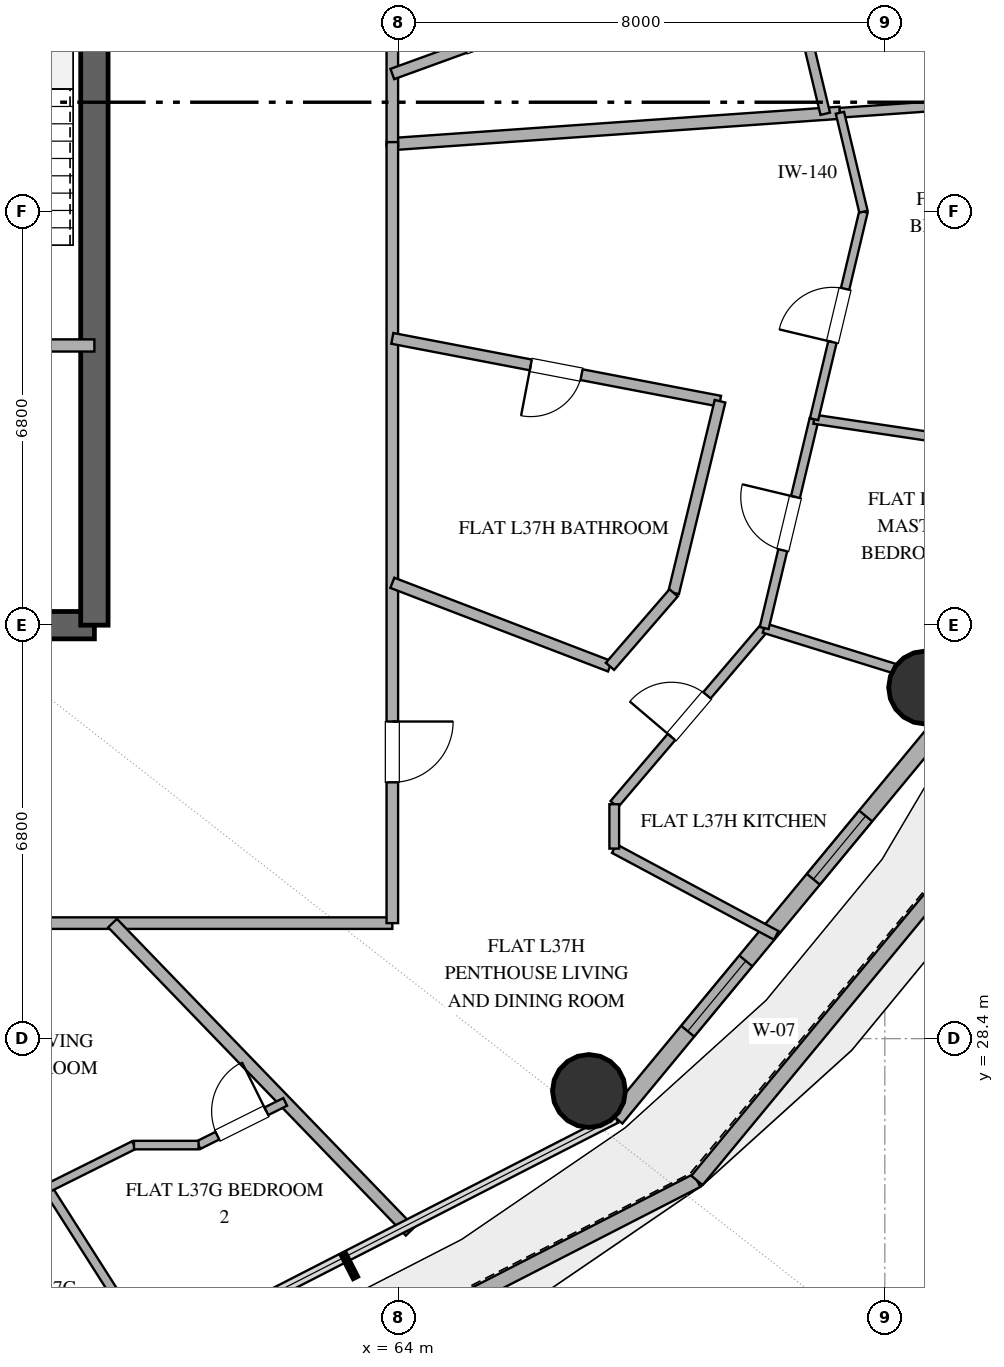
"""IFC4 building model, lengths in metres.
Left out: names, types, materials, properties, quantities, classifications, styles, units other than length and angle.
Written with IfcOpenShell. Run it as: python <this file> out.ifc"""

import sys

from ifc_helpers import new_model, si_unit, direction, frame, frame_2d, origin, origin_2d, place, context, subcontext, project, spatial, rectangle, hollow_circle, extrude, element, fill, save


model = new_model("IFC4")
c1 = context("Model", 3, precision=1e-05, world=origin(), true_north=direction((0.0, 1.0)))
c2 = subcontext(c1, "Body", "Model", "MODEL_VIEW")
j1 = project(units=[si_unit("LENGTHUNIT", "METRE"), si_unit("PLANEANGLEUNIT", "RADIAN")], contexts=[c1])
p1 = place(None, origin())
s1 = spatial("IfcSite", under=j1, at=p1, CompositionType="ELEMENT")
p2 = place(p1, origin())
s2 = spatial("IfcBuilding", under=s1, at=p2, CompositionType="ELEMENT")
p3 = place(p2, frame((0.0, 0.0, 150.6)))
s3 = spatial("IfcBuildingStorey", under=s2, at=p3, CompositionType="ELEMENT", Elevation=150.6)
p4 = place(p3, frame((55.0, 35.2, 0.0), z_axis=(0.0, 0.0, 1.0), x_axis=(1.0, 0.0, 0.0)))
e1 = element("IfcWall", 1, at=p4, inside=s3, PredefinedType="SHEAR", context=c2, shape_type="SweptSolid", body=[
    extrude(rectangle(XDim=4.0, YDim=0.45, at=frame_2d((2.0, 0.0))), origin(), (0.0, 0.0, 1.0), 3.38),
])
p5 = place(p4, frame((1.4, 0.0, 0.0)))
e2 = element("IfcOpeningElement", 2, at=p5, cuts=e1, PredefinedType="OPENING", context=c2, shape_type="SweptSolid", body=[
    extrude(rectangle(XDim=1.2, YDim=2.15, at=frame_2d((0.6, 1.075))), frame((0.0, 0.235, 0.0), z_axis=(0.0, -1.0, 0.0), x_axis=(1.0, 0.0, 0.0)), (0.0, 0.0, 1.0), 0.47),
])
p6 = place(p3, frame((59.0, 35.2, 0.0), z_axis=(0.0, 0.0, 1.0), x_axis=(0.0, 1.0, 0.0)))
e3 = element("IfcWall", 3, at=p6, inside=s3, PredefinedType="SHEAR", context=c2, shape_type="SweptSolid", body=[
    extrude(rectangle(XDim=13.6, YDim=0.45, at=frame_2d((6.8, 0.0))), origin(), (0.0, 0.0, 1.0), 3.38),
])
for number, where, z_axis, x_axis in (
    (4, (67.134, 27.54, 0.0), (0.0, 0.0, 1.0), (1.0, 0.0, 0.0)),
    (5, (72.662, 34.174, 0.0), (0.0, 0.0, 1.0), (1.0, 0.0, 0.0)),
):
    element("IfcColumn", number, at=place(p3, frame(where, z_axis=z_axis, x_axis=x_axis)), inside=s3, PredefinedType="COLUMN", context=c2, shape_type="SweptSolid", body=[
        extrude(hollow_circle(Radius=0.6, WallThickness=0.032, at=origin_2d()), origin(), (0.0, 0.0, 1.0), 3.38),
    ])
p7 = place(p3, frame((59.389, 21.185, 0.0), z_axis=(0.0, 0.0, 1.0), x_axis=(0.8897661473, 0.456416698992, 0.0)))
e6 = element("IfcWall", 6, at=p7, inside=s3, PredefinedType="PARAPET", context=c2, shape_type="SweptSolid", body=[
    extrude(rectangle(XDim=10.7, YDim=0.24, at=frame_2d((5.35, 0.0))), origin(), (0.0, 0.0, 1.0), 1.25),
])
p8 = place(p3, frame((68.91, 26.069, 0.0), z_axis=(0.0, 0.0, 1.0), x_axis=(0.637107627078, 0.770774851379, 0.0)))
e7 = element("IfcWall", 7, at=p8, inside=s3, PredefinedType="PARAPET", context=c2, shape_type="SweptSolid", body=[
    extrude(rectangle(XDim=9.483, YDim=0.24, at=frame_2d((4.742, 0.0))), origin(), (0.0, 0.0, 1.0), 1.25),
])
p9 = place(p3, frame((67.576, 27.094, 0.0), z_axis=(0.0, 0.0, 1.0), x_axis=(0.637333477683, 0.770588111915, 0.0)))
e8 = element("IfcWall", 8, at=p9, inside=s3, PredefinedType="SOLIDWALL", context=c2, shape_type="SweptSolid", body=[
    extrude(rectangle(XDim=8.875, YDim=0.28, at=frame_2d((4.438, 0.0))), origin(), (0.0, 0.0, 1.0), 3.38),
])
p10 = place(p9, frame((1.854, 0.0, 0.85)))
e9 = element("IfcOpeningElement", 9, at=p10, cuts=e8, PredefinedType="OPENING", context=c2, shape_type="SweptSolid", body=[
    extrude(rectangle(XDim=1.5, YDim=1.8, at=frame_2d((0.75, 0.9))), frame((0.0, 0.15, 0.0), z_axis=(0.0, -1.0, 0.0), x_axis=(1.0, 0.0, 0.0)), (0.0, 0.0, 1.0), 0.3),
])
p11 = place(p9, frame((5.097, 0.0, 0.85)))
e10 = element("IfcOpeningElement", 10, at=p11, cuts=e8, PredefinedType="OPENING", context=c2, shape_type="SweptSolid", body=[
    extrude(rectangle(XDim=1.35, YDim=1.8, at=frame_2d((0.675, 0.9))), frame((0.0, 0.15, 0.0), z_axis=(0.0, -1.0, 0.0), x_axis=(1.0, 0.0, 0.0)), (0.0, 0.0, 1.0), 0.3),
])
p12 = place(p3, frame((55.0, 39.8, 0.0), z_axis=(0.0, 0.0, 1.0), x_axis=(1.0, 0.0, 0.0)))
e11 = element("IfcWall", 11, at=p12, inside=s3, PredefinedType="SOLIDWALL", context=c2, shape_type="SweptSolid", body=[
    extrude(rectangle(XDim=4.0, YDim=0.2, at=frame_2d((2.0, 0.0))), origin(), (0.0, 0.0, 1.0), 2.74),
])
p13 = place(p12, frame((1.45, 0.0, 0.0)))
e12 = element("IfcOpeningElement", 12, at=p13, cuts=e11, PredefinedType="OPENING", context=c2, shape_type="SweptSolid", body=[
    extrude(rectangle(XDim=1.1, YDim=2.15, at=frame_2d((0.55, 1.075))), frame((0.0, 0.11, 0.0), z_axis=(0.0, -1.0, 0.0), x_axis=(1.0, 0.0, 0.0)), (0.0, 0.0, 1.0), 0.22),
])
p14 = place(p3, frame((48.891, 30.3, 0.0), z_axis=(0.0, 0.0, 1.0), x_axis=(1.0, 0.0, 0.0)))
e13 = element("IfcWall", 13, at=p14, inside=s3, PredefinedType="PARTITIONING", context=c2, shape_type="SweptSolid", body=[
    extrude(rectangle(XDim=15.009, YDim=0.19, at=frame_2d((7.504, 0.0))), origin(), (0.0, 0.0, 1.0), 2.74),
])
p15 = place(p14, frame((4.704, 0.0, 0.0)))
e14 = element("IfcOpeningElement", 14, at=p15, cuts=e13, PredefinedType="OPENING", context=c2, shape_type="SweptSolid", body=[
    extrude(rectangle(XDim=1.0, YDim=2.2, at=frame_2d((0.5, 1.1))), frame((0.0, 0.105, 0.0), z_axis=(0.0, -1.0, 0.0), x_axis=(1.0, 0.0, 0.0)), (0.0, 0.0, 1.0), 0.21),
])
p16 = place(p3, frame((71.261, 43.627, 0.0), z_axis=(0.0, 0.0, 1.0), x_axis=(-0.997562906323, -0.069772830877, 0.0)))
e15 = element("IfcWall", 15, at=p16, inside=s3, PredefinedType="PARTITIONING", context=c2, shape_type="SweptSolid", body=[
    extrude(rectangle(XDim=7.38, YDim=0.2, at=frame_2d((3.69, 0.0))), origin(), (0.0, 0.0, 1.0), 2.74),
])
p17 = place(p3, frame((63.9, 53.7, 0.0), z_axis=(0.0, 0.0, 1.0), x_axis=(0.0, -1.0, 0.0)))
e16 = element("IfcWall", 16, at=p17, inside=s3, PredefinedType="PARTITIONING", context=c2, shape_type="SweptSolid", body=[
    extrude(rectangle(XDim=10.62, YDim=0.19, at=frame_2d((5.31, 0.0))), origin(), (0.0, 0.0, 1.0), 2.74),
])
p18 = place(p17, frame((2.48, 0.0, 0.0)))
e17 = element("IfcOpeningElement", 17, at=p18, cuts=e16, PredefinedType="OPENING", context=c2, shape_type="SweptSolid", body=[
    extrude(rectangle(XDim=1.0, YDim=2.2, at=frame_2d((0.5, 1.1))), frame((0.0, 0.105, 0.0), z_axis=(0.0, -1.0, 0.0), x_axis=(1.0, 0.0, 0.0)), (0.0, 0.0, 1.0), 0.21),
])
p19 = place(p3, frame((63.9, 43.144, 0.0), z_axis=(0.0, 0.0, 1.0), x_axis=(0.0, -1.0, 0.0)))
e18 = element("IfcWall", 18, at=p19, inside=s3, PredefinedType="PARTITIONING", context=c2, shape_type="SweptSolid", body=[
    extrude(rectangle(XDim=12.844, YDim=0.19, at=frame_2d((6.422, 0.0))), origin(), (0.0, 0.0, 1.0), 2.74),
])
p20 = place(p19, frame((9.529, 0.0, 0.0)))
e19 = element("IfcOpeningElement", 19, at=p20, cuts=e18, PredefinedType="OPENING", context=c2, shape_type="SweptSolid", body=[
    extrude(rectangle(XDim=1.0, YDim=2.2, at=frame_2d((0.5, 1.1))), frame((0.0, 0.105, 0.0), z_axis=(0.0, -1.0, 0.0), x_axis=(1.0, 0.0, 0.0)), (0.0, 0.0, 1.0), 0.21),
])
p21 = place(p3, frame((69.29, 38.883, 0.0), z_axis=(0.0, 0.0, 1.0), x_axis=(-0.98210182834, 0.188350733396, 0.0)))
e20 = element("IfcWall", 20, at=p21, inside=s3, PredefinedType="PLUMBINGWALL", context=c2, shape_type="SweptSolid", body=[
    extrude(rectangle(XDim=5.488, YDim=0.18, at=frame_2d((2.744, 0.0))), origin(), (0.0, 0.0, 1.0), 2.74),
])
p22 = place(p21, frame((2.319, 0.0, 0.0)))
e21 = element("IfcOpeningElement", 21, at=p22, cuts=e20, PredefinedType="OPENING", context=c2, shape_type="SweptSolid", body=[
    extrude(rectangle(XDim=0.85, YDim=2.1, at=frame_2d((0.425, 1.05))), frame((0.0, 0.1, 0.0), z_axis=(0.0, -1.0, 0.0), x_axis=(1.0, 0.0, 0.0)), (0.0, 0.0, 1.0), 0.2),
])
p23 = place(p3, frame((69.793, 48.728, 0.0), z_axis=(0.0, 0.0, 1.0), x_axis=(0.23310450522, -0.972451690135, 0.0)))
e22 = element("IfcWall", 22, at=p23, inside=s3, PredefinedType="PLUMBINGWALL", context=c2, shape_type="SweptSolid", body=[
    extrude(rectangle(XDim=5.263, YDim=0.16, at=frame_2d((2.631, 0.0))), origin(), (0.0, 0.0, 1.0), 2.74),
])
p24 = place(p23, frame((2.181, 0.0, 0.0)))
e23 = element("IfcOpeningElement", 23, at=p24, cuts=e22, PredefinedType="OPENING", context=c2, shape_type="SweptSolid", body=[
    extrude(rectangle(XDim=0.9, YDim=2.1, at=frame_2d((0.45, 1.05))), frame((0.0, 0.09, 0.0), z_axis=(0.0, -1.0, 0.0), x_axis=(1.0, 0.0, 0.0)), (0.0, 0.0, 1.0), 0.18),
])
p25 = place(p3, frame((59.299, 30.3, 0.0), z_axis=(0.0, 0.0, 1.0), x_axis=(0.694647685064, -0.719350118952, 0.0)))
e24 = element("IfcWall", 24, at=p25, inside=s3, PredefinedType="PARTITIONING", context=c2, shape_type="SweptSolid", body=[
    extrude(rectangle(XDim=7.047, YDim=0.2, at=frame_2d((3.523, 0.0))), origin(), (0.0, 0.0, 1.0), 2.74),
])
p26 = place(p3, frame((63.9, 35.896, 0.0), z_axis=(0.0, 0.0, 1.0), x_axis=(0.933598121494, -0.3583218491, 0.0)))
e25 = element("IfcWall", 25, at=p26, inside=s3, PredefinedType="PLUMBINGWALL", context=c2, shape_type="SweptSolid", body=[
    extrude(rectangle(XDim=3.834, YDim=0.18, at=frame_2d((1.917, 0.0))), origin(), (0.0, 0.0, 1.0), 2.74),
])
p27 = place(p3, frame((67.55, 32.256, 0.0), z_axis=(0.0, 0.0, 1.0), x_axis=(0.648060027494, 0.76158925988, 0.0)))
e26 = element("IfcWall", 26, at=p27, inside=s3, PredefinedType="PLUMBINGWALL", context=c2, shape_type="SweptSolid", body=[
    extrude(rectangle(XDim=3.804, YDim=0.16, at=frame_2d((1.902, 0.0))), origin(), (0.0, 0.0, 1.0), 2.74),
])
p28 = place(p27, frame((1.452, 0.0, 0.0)))
e27 = element("IfcOpeningElement", 27, at=p28, cuts=e26, PredefinedType="OPENING", context=c2, shape_type="SweptSolid", body=[
    extrude(rectangle(XDim=0.9, YDim=2.1, at=frame_2d((0.45, 1.05))), frame((0.0, 0.09, 0.0), z_axis=(0.0, -1.0, 0.0), x_axis=(1.0, 0.0, 0.0)), (0.0, 0.0, 1.0), 0.18),
])
p29 = place(p3, frame((70.015, 35.153, 0.0), z_axis=(0.0, 0.0, 1.0), x_axis=(0.954891562425, -0.296954717101, 0.0)))
e28 = element("IfcWall", 28, at=p29, inside=s3, PredefinedType="PLUMBINGWALL", context=c2, shape_type="SweptSolid", body=[
    extrude(rectangle(XDim=3.539, YDim=0.16, at=frame_2d((1.769, 0.0))), origin(), (0.0, 0.0, 1.0), 2.74),
])
p30 = place(p3, frame((71.261, 43.627, 0.0), z_axis=(0.0, 0.0, 1.0), x_axis=(0.997563824095, 0.069759707979, 0.0)))
e29 = element("IfcWall", 29, at=p30, inside=s3, PredefinedType="PLUMBINGWALL", context=c2, shape_type="SweptSolid", body=[
    extrude(rectangle(XDim=3.535, YDim=0.16, at=frame_2d((1.767, 0.0))), origin(), (0.0, 0.0, 1.0), 2.74),
])
p31 = place(p3, frame((70.015, 35.153, 0.0), z_axis=(0.0, 0.0, 1.0), x_axis=(0.232452361323, 0.972607783084, 0.0)))
e30 = element("IfcWall", 30, at=p31, inside=s3, PredefinedType="PARTITIONING", context=c2, shape_type="SweptSolid", body=[
    extrude(rectangle(XDim=3.531, YDim=0.15, at=frame_2d((1.766, 0.0))), origin(), (0.0, 0.0, 1.0), 2.74),
])
p32 = place(p31, frame((1.315, 0.0, 0.0)))
e31 = element("IfcOpeningElement", 31, at=p32, cuts=e30, PredefinedType="OPENING", context=c2, shape_type="SweptSolid", body=[
    extrude(rectangle(XDim=0.9, YDim=2.1, at=frame_2d((0.45, 1.05))), frame((0.0, 0.085, 0.0), z_axis=(0.0, -1.0, 0.0), x_axis=(1.0, 0.0, 0.0)), (0.0, 0.0, 1.0), 0.17),
])
p33 = place(p3, frame((74.312, 38.068, 0.0), z_axis=(0.0, 0.0, 1.0), x_axis=(-0.989013160958, 0.147827492205, 0.0)))
e32 = element("IfcWall", 32, at=p33, inside=s3, PredefinedType="PARTITIONING", context=c2, shape_type="SweptSolid", body=[
    extrude(rectangle(XDim=3.514, YDim=0.15, at=frame_2d((1.757, 0.0))), origin(), (0.0, 0.0, 1.0), 2.74),
])
p34 = place(p3, frame((70.836, 38.587, 0.0), z_axis=(0.0, 0.0, 1.0), x_axis=(0.231598574747, 0.972811441223, 0.0)))
e33 = element("IfcWall", 33, at=p34, inside=s3, PredefinedType="PARTITIONING", context=c2, shape_type="SweptSolid", body=[
    extrude(rectangle(XDim=3.508, YDim=0.14, at=frame_2d((1.754, 0.0))), origin(), (0.0, 0.0, 1.0), 2.74),
])
p35 = place(p34, frame((1.304, 0.0, 0.0)))
e34 = element("IfcOpeningElement", 34, at=p35, cuts=e33, PredefinedType="OPENING", context=c2, shape_type="SweptSolid", body=[
    extrude(rectangle(XDim=0.9, YDim=2.1, at=frame_2d((0.45, 1.05))), frame((0.0, 0.08, 0.0), z_axis=(0.0, -1.0, 0.0), x_axis=(1.0, 0.0, 0.0)), (0.0, 0.0, 1.0), 0.16),
])
p36 = place(p3, frame((63.9, 44.264, 0.0), z_axis=(0.0, 0.0, 1.0), x_axis=(0.939936319397, 0.341349843238, 0.0)))
e35 = element("IfcWall", 35, at=p36, inside=s3, PredefinedType="PLUMBINGWALL", context=c2, shape_type="SweptSolid", body=[
    extrude(rectangle(XDim=3.39, YDim=0.18, at=frame_2d((1.695, 0.0))), origin(), (0.0, 0.0, 1.0), 2.74),
])
p37 = place(p36, frame((1.27, 0.0, 0.0)))
e36 = element("IfcOpeningElement", 36, at=p37, cuts=e35, PredefinedType="OPENING", context=c2, shape_type="SweptSolid", body=[
    extrude(rectangle(XDim=0.85, YDim=2.1, at=frame_2d((0.425, 1.05))), frame((0.0, 0.1, 0.0), z_axis=(0.0, -1.0, 0.0), x_axis=(1.0, 0.0, 0.0)), (0.0, 0.0, 1.0), 0.2),
])
p38 = place(p3, frame((60.042, 23.097, 0.0), z_axis=(0.0, 0.0, 1.0), x_axis=(-0.537325063909, 0.843375228291, 0.0)))
e37 = element("IfcWall", 37, at=p38, inside=s3, PredefinedType="PARTITIONING", context=c2, shape_type="SweptSolid", body=[
    extrude(rectangle(XDim=3.373, YDim=0.15, at=frame_2d((1.687, 0.0))), origin(), (0.0, 0.0, 1.0), 2.74),
])
p39 = place(p3, frame((68.526, 35.732, 0.0), z_axis=(0.0, 0.0, 1.0), x_axis=(0.235531062042, 0.971866821541, 0.0)))
e38 = element("IfcWall", 38, at=p39, inside=s3, PredefinedType="PLUMBINGWALL", context=c2, shape_type="SweptSolid", body=[
    extrude(rectangle(XDim=3.242, YDim=0.18, at=frame_2d((1.621, 0.0))), origin(), (0.0, 0.0, 1.0), 2.74),
])
p40 = place(p3, frame((70.214, 30.099, 0.0), z_axis=(0.0, 0.0, 1.0), x_axis=(-0.881434325569, 0.472306605616, 0.0)))
e39 = element("IfcWall", 39, at=p40, inside=s3, PredefinedType="PLUMBINGWALL", context=c2, shape_type="SweptSolid", body=[
    extrude(rectangle(XDim=3.022, YDim=0.16, at=frame_2d((1.511, 0.0))), origin(), (0.0, 0.0, 1.0), 2.74),
])
p41 = place(p3, frame((71.649, 42.0, 0.0), z_axis=(0.0, 0.0, 1.0), x_axis=(-0.231561310927, 0.972820311919, 0.0)))
e40 = element("IfcWall", 40, at=p41, inside=s3, PredefinedType="PARTITIONING", context=c2, shape_type="SweptSolid", body=[
    extrude(rectangle(XDim=1.672, YDim=0.14, at=frame_2d((0.836, 0.0))), origin(), (0.0, 0.0, 1.0), 2.74),
])
p42 = place(p3, frame((67.479, 34.523, 0.0), z_axis=(0.0, 0.0, 1.0), x_axis=(0.654605010187, 0.755971084525, 0.0)))
e41 = element("IfcWall", 41, at=p42, inside=s3, PredefinedType="PLUMBINGWALL", context=c2, shape_type="SweptSolid", body=[
    extrude(rectangle(XDim=1.599, YDim=0.18, at=frame_2d((0.8, 0.0))), origin(), (0.0, 0.0, 1.0), 2.74),
])
p43 = place(p3, frame((60.713, 26.65, 0.0), z_axis=(0.0, 0.0, 1.0), x_axis=(0.894917522296, 0.446231585937, 0.0)))
e42 = element("IfcWall", 42, at=p43, inside=s3, PredefinedType="PARTITIONING", context=c2, shape_type="SweptSolid", body=[
    extrude(rectangle(XDim=1.592, YDim=0.14, at=frame_2d((0.796, 0.0))), origin(), (0.0, 0.0, 1.0), 2.74),
])
p44 = place(p43, frame((0.346, 0.0, 0.0)))
e43 = element("IfcOpeningElement", 43, at=p44, cuts=e42, PredefinedType="OPENING", context=c2, shape_type="SweptSolid", body=[
    extrude(rectangle(XDim=0.9, YDim=2.1, at=frame_2d((0.45, 1.05))), frame((0.0, 0.08, 0.0), z_axis=(0.0, -1.0, 0.0), x_axis=(1.0, 0.0, 0.0)), (0.0, 0.0, 1.0), 0.16),
])
p45 = place(p3, frame((58.23, 25.942, 0.0), z_axis=(0.0, 0.0, 1.0), x_axis=(0.895072075717, 0.445921494516, 0.0)))
e44 = element("IfcWall", 44, at=p45, inside=s3, PredefinedType="PARTITIONING", context=c2, shape_type="SweptSolid", body=[
    extrude(rectangle(XDim=1.588, YDim=0.14, at=frame_2d((0.794, 0.0))), origin(), (0.0, 0.0, 1.0), 2.74),
])
p46 = place(p3, frame((59.651, 26.65, 0.0), z_axis=(0.0, 0.0, 1.0), x_axis=(1.0, 0.0, 0.0)))
e45 = element("IfcWall", 45, at=p46, inside=s3, PredefinedType="PARTITIONING", context=c2, shape_type="SweptSolid", body=[
    extrude(rectangle(XDim=1.062, YDim=0.14, at=frame_2d((0.531, 0.0))), origin(), (0.0, 0.0, 1.0), 2.74),
])
p47 = place(p3, frame((67.55, 31.526, 0.0), z_axis=(0.0, 0.0, 1.0), x_axis=(0.0, 1.0, 0.0)))
e46 = element("IfcWall", 46, at=p47, inside=s3, PredefinedType="PLUMBINGWALL", context=c2, shape_type="SweptSolid", body=[
    extrude(rectangle(XDim=0.73, YDim=0.16, at=frame_2d((0.365, 0.0))), origin(), (0.0, 0.0, 1.0), 2.74),
])
p48 = place(p10, origin())
e47 = element("IfcWindow", 47, at=p48, inside=s3, PartitioningType="SINGLE_PANEL", PredefinedType="WINDOW", context=c2, shape_type="SweptSolid", body=[
    extrude(rectangle(XDim=1.5, YDim=1.8, at=frame_2d((0.75, 0.9))), frame((0.0, 0.03, 0.0), z_axis=(0.0, -1.0, 0.0), x_axis=(1.0, 0.0, 0.0)), (0.0, 0.0, 1.0), 0.06),
])
fill(e9, e47)
p49 = place(p11, origin())
e48 = element("IfcWindow", 48, at=p49, inside=s3, PartitioningType="SINGLE_PANEL", PredefinedType="WINDOW", context=c2, shape_type="SweptSolid", body=[
    extrude(rectangle(XDim=1.35, YDim=1.8, at=frame_2d((0.675, 0.9))), frame((0.0, 0.03, 0.0), z_axis=(0.0, -1.0, 0.0), x_axis=(1.0, 0.0, 0.0)), (0.0, 0.0, 1.0), 0.06),
])
fill(e10, e48)
p50 = place(p20, origin())
e49 = element("IfcDoor", 49, at=p50, inside=s3, OperationType="SINGLE_SWING_LEFT", PredefinedType="DOOR", context=c2, shape_type="SweptSolid", body=[
    extrude(rectangle(XDim=1.0, YDim=2.2, at=frame_2d((0.5, 1.1))), frame((0.0, 0.025, 0.0), z_axis=(0.0, -1.0, 0.0), x_axis=(1.0, 0.0, 0.0)), (0.0, 0.0, 1.0), 0.05),
])
fill(e19, e49)
p51 = place(p22, origin())
e50 = element("IfcDoor", 50, at=p51, inside=s3, OperationType="SINGLE_SWING_RIGHT", PredefinedType="DOOR", context=c2, shape_type="SweptSolid", body=[
    extrude(rectangle(XDim=0.85, YDim=2.1, at=frame_2d((0.425, 1.05))), frame((0.0, 0.025, 0.0), z_axis=(0.0, -1.0, 0.0), x_axis=(1.0, 0.0, 0.0)), (0.0, 0.0, 1.0), 0.05),
])
fill(e21, e50)
p52 = place(p28, origin())
e51 = element("IfcDoor", 51, at=p52, inside=s3, OperationType="SINGLE_SWING_LEFT", PredefinedType="DOOR", context=c2, shape_type="SweptSolid", body=[
    extrude(rectangle(XDim=0.9, YDim=2.1, at=frame_2d((0.45, 1.05))), frame((0.0, 0.025, 0.0), z_axis=(0.0, -1.0, 0.0), x_axis=(1.0, 0.0, 0.0)), (0.0, 0.0, 1.0), 0.05),
])
fill(e27, e51)
p53 = place(p32, origin())
e52 = element("IfcDoor", 52, at=p53, inside=s3, OperationType="SINGLE_SWING_RIGHT", PredefinedType="DOOR", context=c2, shape_type="SweptSolid", body=[
    extrude(rectangle(XDim=0.9, YDim=2.1, at=frame_2d((0.45, 1.05))), frame((0.0, 0.025, 0.0), z_axis=(0.0, -1.0, 0.0), x_axis=(1.0, 0.0, 0.0)), (0.0, 0.0, 1.0), 0.05),
])
fill(e31, e52)
p54 = place(p35, origin())
e53 = element("IfcDoor", 53, at=p54, inside=s3, OperationType="SINGLE_SWING_LEFT", PredefinedType="DOOR", context=c2, shape_type="SweptSolid", body=[
    extrude(rectangle(XDim=0.9, YDim=2.1, at=frame_2d((0.45, 1.05))), frame((0.0, 0.025, 0.0), z_axis=(0.0, -1.0, 0.0), x_axis=(1.0, 0.0, 0.0)), (0.0, 0.0, 1.0), 0.05),
])
fill(e34, e53)
p55 = place(p44, origin())
e54 = element("IfcDoor", 54, at=p55, inside=s3, OperationType="SINGLE_SWING_RIGHT", PredefinedType="DOOR", context=c2, shape_type="SweptSolid", body=[
    extrude(rectangle(XDim=0.9, YDim=2.1, at=frame_2d((0.45, 1.05))), frame((0.0, 0.025, 0.0), z_axis=(0.0, -1.0, 0.0), x_axis=(1.0, 0.0, 0.0)), (0.0, 0.0, 1.0), 0.05),
])
fill(e43, e54)
save(model, sys.argv[1])
